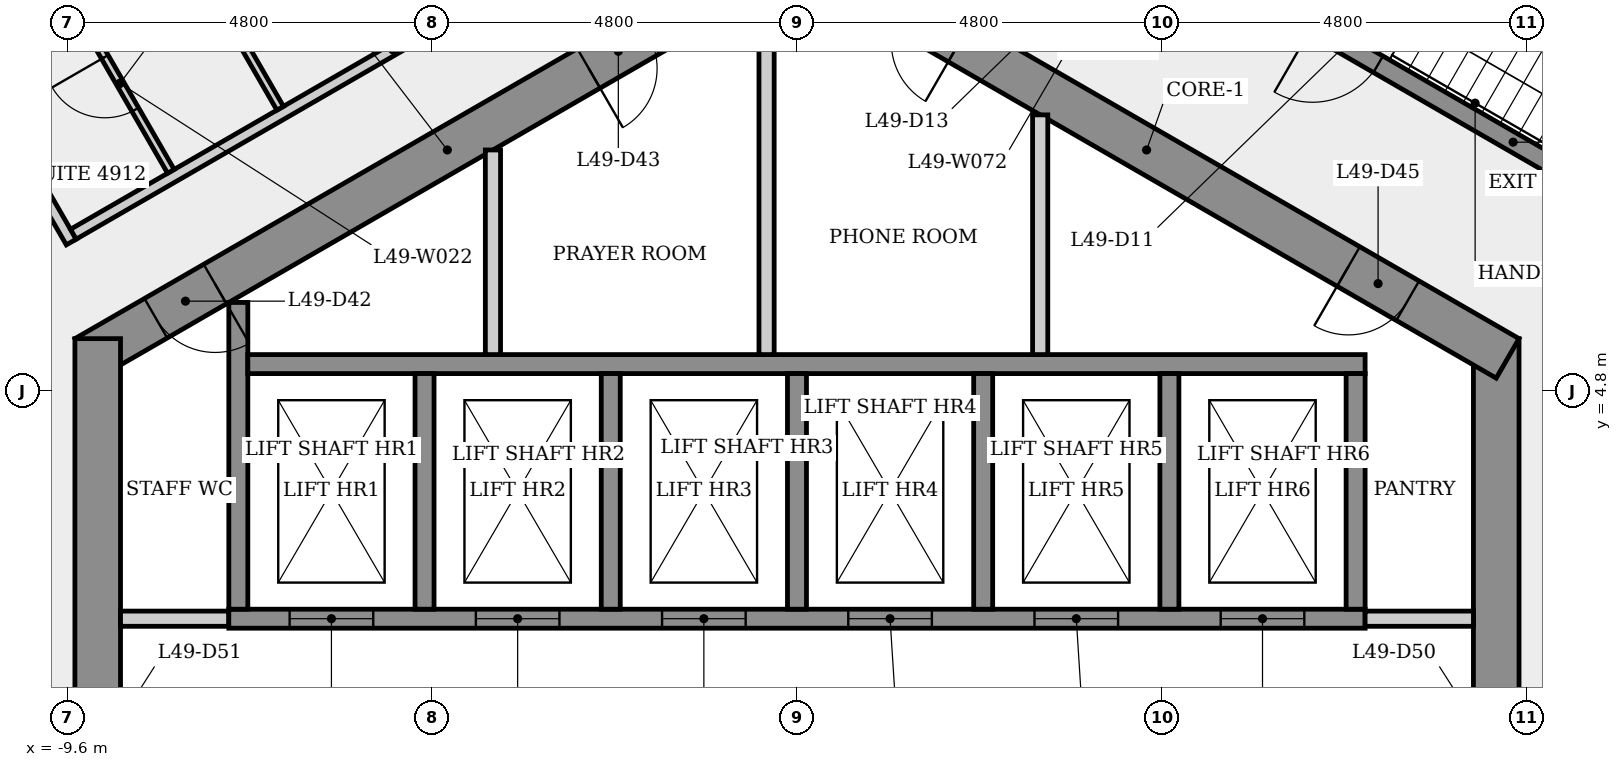
"""IFC4 building model, lengths in metres.
Left out: names, types, materials, properties, quantities, classifications, styles, units other than length and angle.
Written with IfcOpenShell. Run it as: python <this file> out.ifc"""

import sys

from ifc_helpers import new_model, si_unit, direction, frame, frame_2d, origin, place, context, subcontext, project, spatial, rectangle, extrude, element, fill, save


model = new_model("IFC4")
c1 = context("Model", 3, precision=1e-05, world=origin(), true_north=direction((0.0, 1.0)))
c2 = subcontext(c1, "Body", "Model", "MODEL_VIEW")
j1 = project(units=[si_unit("LENGTHUNIT", "METRE"), si_unit("PLANEANGLEUNIT", "RADIAN")], contexts=[c1])
p1 = place(None, origin())
s1 = spatial("IfcSite", under=j1, at=p1, CompositionType="ELEMENT")
p2 = place(p1, origin())
s2 = spatial("IfcBuilding", under=s1, at=p2, CompositionType="ELEMENT")
p3 = place(p2, frame((0.0, 0.0, 183.3)))
s3 = spatial("IfcBuildingStorey", under=s2, at=p3, CompositionType="ELEMENT", Elevation=183.3)
p4 = place(p3, frame((9.2, -5.485, 0.0), z_axis=(0.0, 0.0, 1.0), x_axis=(0.0, 1.0, 0.0)))
e1 = element("IfcWall", 1, at=p4, inside=s3, PredefinedType="SHEAR", context=c2, shape_type="SweptSolid", body=[
    extrude(rectangle(XDim=10.97, YDim=0.6, at=frame_2d((5.485, 0.0))), origin(), (0.0, 0.0, 1.0), 3.4),
])
p5 = place(p4, frame((4.685, 0.0, 0.0)))
e2 = element("IfcOpeningElement", 2, at=p5, cuts=e1, PredefinedType="OPENING", context=c2, shape_type="SweptSolid", body=[
    extrude(rectangle(XDim=1.6, YDim=2.1, at=frame_2d((0.8, 1.05))), frame((0.0, 0.31, 0.0), z_axis=(0.0, -1.0, 0.0), x_axis=(1.0, 0.0, 0.0)), (0.0, 0.0, 1.0), 0.62),
])
p6 = place(p3, frame((9.35, 5.225, 0.0), z_axis=(0.0, 0.0, 1.0), x_axis=(-0.866023993627, 0.500002442456, 0.0)))
e3 = element("IfcWall", 3, at=p6, inside=s3, PredefinedType="SHEAR", context=c2, shape_type="SweptSolid", body=[
    extrude(rectangle(XDim=10.97, YDim=0.6, at=frame_2d((5.485, 0.0))), origin(), (0.0, 0.0, 1.0), 3.4),
])
p7 = place(p6, frame((8.325, 0.0, 0.0)))
e4 = element("IfcOpeningElement", 4, at=p7, cuts=e3, PredefinedType="OPENING", context=c2, shape_type="SweptSolid", body=[
    extrude(rectangle(XDim=0.9, YDim=2.1, at=frame_2d((0.45, 1.05))), frame((0.0, 0.31, 0.0), z_axis=(0.0, -1.0, 0.0), x_axis=(1.0, 0.0, 0.0)), (0.0, 0.0, 1.0), 0.62),
])
p8 = place(p6, frame((1.518, 0.0, 0.0)))
e5 = element("IfcOpeningElement", 5, at=p8, cuts=e3, PredefinedType="OPENING", context=c2, shape_type="SweptSolid", body=[
    extrude(rectangle(XDim=0.9, YDim=2.1, at=frame_2d((0.45, 1.05))), frame((0.0, 0.31, 0.0), z_axis=(0.0, -1.0, 0.0), x_axis=(1.0, 0.0, 0.0)), (0.0, 0.0, 1.0), 0.62),
])
p9 = place(p3, frame((0.15, 10.71, 0.0), z_axis=(0.0, 0.0, 1.0), x_axis=(-0.866023993627, -0.500002442456, 0.0)))
e6 = element("IfcWall", 6, at=p9, inside=s3, PredefinedType="SHEAR", context=c2, shape_type="SweptSolid", body=[
    extrude(rectangle(XDim=10.97, YDim=0.6, at=frame_2d((5.485, 0.0))), origin(), (0.0, 0.0, 1.0), 3.4),
])
p10 = place(p9, frame((9.013, 0.0, 0.0)))
e7 = element("IfcOpeningElement", 7, at=p10, cuts=e6, PredefinedType="OPENING", context=c2, shape_type="SweptSolid", body=[
    extrude(rectangle(XDim=0.9, YDim=2.1, at=frame_2d((0.45, 1.05))), frame((0.0, 0.31, 0.0), z_axis=(0.0, -1.0, 0.0), x_axis=(1.0, 0.0, 0.0)), (0.0, 0.0, 1.0), 0.62),
])
p11 = place(p9, frame((2.437, 0.0, 0.0)))
e8 = element("IfcOpeningElement", 8, at=p11, cuts=e6, PredefinedType="OPENING", context=c2, shape_type="SweptSolid", body=[
    extrude(rectangle(XDim=0.9, YDim=2.1, at=frame_2d((0.45, 1.05))), frame((0.0, 0.31, 0.0), z_axis=(0.0, -1.0, 0.0), x_axis=(1.0, 0.0, 0.0)), (0.0, 0.0, 1.0), 0.62),
])
p12 = place(p3, frame((-9.2, 5.485, 0.0), z_axis=(0.0, 0.0, 1.0), x_axis=(0.0, -1.0, 0.0)))
e9 = element("IfcWall", 9, at=p12, inside=s3, PredefinedType="SHEAR", context=c2, shape_type="SweptSolid", body=[
    extrude(rectangle(XDim=10.97, YDim=0.6, at=frame_2d((5.485, 0.0))), origin(), (0.0, 0.0, 1.0), 3.4),
])
p13 = place(p12, frame((8.516, 0.0, 0.0)))
e10 = element("IfcOpeningElement", 10, at=p13, cuts=e9, PredefinedType="OPENING", context=c2, shape_type="SweptSolid", body=[
    extrude(rectangle(XDim=0.9, YDim=2.1, at=frame_2d((0.45, 1.05))), frame((0.0, 0.31, 0.0), z_axis=(0.0, -1.0, 0.0), x_axis=(1.0, 0.0, 0.0)), (0.0, 0.0, 1.0), 0.62),
])
p14 = place(p12, frame((4.685, 0.0, 0.0)))
e11 = element("IfcOpeningElement", 11, at=p14, cuts=e9, PredefinedType="OPENING", context=c2, shape_type="SweptSolid", body=[
    extrude(rectangle(XDim=1.6, YDim=2.1, at=frame_2d((0.8, 1.05))), frame((0.0, 0.31, 0.0), z_axis=(0.0, -1.0, 0.0), x_axis=(1.0, 0.0, 0.0)), (0.0, 0.0, 1.0), 0.62),
])
p15 = place(p3, frame((-12.04, 11.072, 0.0), z_axis=(0.0, 0.0, 1.0), x_axis=(0.499985374448, -0.866033847686, 0.0)))
e12 = element("IfcWall", 12, at=p15, inside=s3, PredefinedType="PARTITIONING", context=c2, shape_type="SweptSolid", body=[
    extrude(rectangle(XDim=4.984, YDim=0.15, at=frame_2d((2.492, 0.0))), origin(), (0.0, 0.0, 1.0), 3.0),
])
p16 = place(p15, frame((0.589, 0.0, 0.0)))
e13 = element("IfcOpeningElement", 13, at=p16, cuts=e12, PredefinedType="OPENING", context=c2, shape_type="SweptSolid", body=[
    extrude(rectangle(XDim=0.9, YDim=2.1, at=frame_2d((0.45, 1.05))), frame((0.0, 0.085, 0.0), z_axis=(0.0, -1.0, 0.0), x_axis=(1.0, 0.0, 0.0)), (0.0, 0.0, 1.0), 0.17),
])
p17 = place(p3, frame((-9.556, 10.071, 0.0), z_axis=(0.0, 0.0, 1.0), x_axis=(-0.866002311072, -0.500039995618, 0.0)))
e14 = element("IfcWall", 14, at=p17, inside=s3, PredefinedType="PARTITIONING", context=c2, shape_type="SweptSolid", body=[
    extrude(rectangle(XDim=1.575, YDim=0.1, at=frame_2d((0.788, 0.0))), origin(), (0.0, 0.0, 1.0), 3.0),
])
p18 = place(p3, frame((-9.521, 6.859, 0.0), z_axis=(0.0, 0.0, 1.0), x_axis=(0.866022649559, 0.500004770428, 0.0)))
e15 = element("IfcWall", 15, at=p18, inside=s3, PredefinedType="PARTITIONING", context=c2, shape_type="SweptSolid", body=[
    extrude(rectangle(XDim=9.707, YDim=0.15, at=frame_2d((4.853, 0.0))), origin(), (0.0, 0.0, 1.0), 3.0),
])
p19 = place(p18, frame((5.961, 0.0, 0.0)))
e16 = element("IfcOpeningElement", 16, at=p19, cuts=e15, PredefinedType="OPENING", context=c2, shape_type="SweptSolid", body=[
    extrude(rectangle(XDim=1.0, YDim=2.1, at=frame_2d((0.5, 1.05))), frame((0.0, 0.085, 0.0), z_axis=(0.0, -1.0, 0.0), x_axis=(1.0, 0.0, 0.0)), (0.0, 0.0, 1.0), 0.17),
])
p20 = place(p3, frame((-8.9, 1.8, 0.0), z_axis=(0.0, 0.0, 1.0), x_axis=(1.0, 0.0, 0.0)))
e17 = element("IfcWall", 17, at=p20, inside=s3, PredefinedType="PARTITIONING", context=c2, shape_type="SweptSolid", body=[
    extrude(rectangle(XDim=1.425, YDim=0.2, at=frame_2d((0.712, 0.0))), origin(), (0.0, 0.0, 1.0), 3.0),
])
p21 = place(p3, frame((-8.237, 7.686, 0.0), z_axis=(0.0, 0.0, 1.0), x_axis=(-0.499967368674, 0.86604424267, 0.0)))
e18 = element("IfcWall", 18, at=p21, inside=s3, PredefinedType="PARTITIONING", context=c2, shape_type="SweptSolid", body=[
    extrude(rectangle(XDim=2.675, YDim=0.1, at=frame_2d((1.337, 0.0))), origin(), (0.0, 0.0, 1.0), 3.0),
])
p22 = place(p21, frame((0.938, 0.0, 0.0)))
e19 = element("IfcOpeningElement", 19, at=p22, cuts=e18, PredefinedType="OPENING", context=c2, shape_type="SweptSolid", body=[
    extrude(rectangle(XDim=0.8, YDim=2.1, at=frame_2d((0.4, 1.05))), frame((0.0, 0.06, 0.0), z_axis=(0.0, -1.0, 0.0), x_axis=(1.0, 0.0, 0.0)), (0.0, 0.0, 1.0), 0.12),
])
p23 = place(p3, frame((-7.475, 1.8, 0.0), z_axis=(0.0, 0.0, 1.0), x_axis=(1.0, 0.0, 0.0)))
e20 = element("IfcWall", 20, at=p23, inside=s3, PredefinedType="SHEAR", context=c2, shape_type="SweptSolid", body=[
    extrude(rectangle(XDim=14.95, YDim=0.25, at=frame_2d((7.475, 0.0))), origin(), (0.0, 0.0, 1.0), 3.0),
])
p24 = place(p23, frame((0.8, 0.0, 0.0)))
e21 = element("IfcOpeningElement", 21, at=p24, cuts=e20, PredefinedType="OPENING", context=c2, shape_type="SweptSolid", body=[
    extrude(rectangle(XDim=1.1, YDim=2.1, at=frame_2d((0.55, 1.05))), frame((0.0, 0.135, 0.0), z_axis=(0.0, -1.0, 0.0), x_axis=(1.0, 0.0, 0.0)), (0.0, 0.0, 1.0), 0.27),
])
p25 = place(p23, frame((3.25, 0.0, 0.0)))
e22 = element("IfcOpeningElement", 22, at=p25, cuts=e20, PredefinedType="OPENING", context=c2, shape_type="SweptSolid", body=[
    extrude(rectangle(XDim=1.1, YDim=2.1, at=frame_2d((0.55, 1.05))), frame((0.0, 0.135, 0.0), z_axis=(0.0, -1.0, 0.0), x_axis=(1.0, 0.0, 0.0)), (0.0, 0.0, 1.0), 0.27),
])
p26 = place(p23, frame((5.7, 0.0, 0.0)))
e23 = element("IfcOpeningElement", 23, at=p26, cuts=e20, PredefinedType="OPENING", context=c2, shape_type="SweptSolid", body=[
    extrude(rectangle(XDim=1.1, YDim=2.1, at=frame_2d((0.55, 1.05))), frame((0.0, 0.135, 0.0), z_axis=(0.0, -1.0, 0.0), x_axis=(1.0, 0.0, 0.0)), (0.0, 0.0, 1.0), 0.27),
])
p27 = place(p23, frame((8.15, 0.0, 0.0)))
e24 = element("IfcOpeningElement", 24, at=p27, cuts=e20, PredefinedType="OPENING", context=c2, shape_type="SweptSolid", body=[
    extrude(rectangle(XDim=1.1, YDim=2.1, at=frame_2d((0.55, 1.05))), frame((0.0, 0.135, 0.0), z_axis=(0.0, -1.0, 0.0), x_axis=(1.0, 0.0, 0.0)), (0.0, 0.0, 1.0), 0.27),
])
p28 = place(p23, frame((10.6, 0.0, 0.0)))
e25 = element("IfcOpeningElement", 25, at=p28, cuts=e20, PredefinedType="OPENING", context=c2, shape_type="SweptSolid", body=[
    extrude(rectangle(XDim=1.1, YDim=2.1, at=frame_2d((0.55, 1.05))), frame((0.0, 0.135, 0.0), z_axis=(0.0, -1.0, 0.0), x_axis=(1.0, 0.0, 0.0)), (0.0, 0.0, 1.0), 0.27),
])
p29 = place(p23, frame((13.05, 0.0, 0.0)))
e26 = element("IfcOpeningElement", 26, at=p29, cuts=e20, PredefinedType="OPENING", context=c2, shape_type="SweptSolid", body=[
    extrude(rectangle(XDim=1.1, YDim=2.1, at=frame_2d((0.55, 1.05))), frame((0.0, 0.135, 0.0), z_axis=(0.0, -1.0, 0.0), x_axis=(1.0, 0.0, 0.0)), (0.0, 0.0, 1.0), 0.27),
])
p30 = place(p3, frame((-7.35, 1.925, 0.0), z_axis=(0.0, 0.0, 1.0), x_axis=(0.0, 1.0, 0.0)))
e27 = element("IfcWall", 27, at=p30, inside=s3, PredefinedType="SHEAR", context=c2, shape_type="SweptSolid", body=[
    extrude(rectangle(XDim=4.036, YDim=0.25, at=frame_2d((2.018, 0.0))), origin(), (0.0, 0.0, 1.0), 3.0),
])
p31 = place(p3, frame((-7.225, 5.15, 0.0), z_axis=(0.0, 0.0, 1.0), x_axis=(1.0, 0.0, 0.0)))
e28 = element("IfcWall", 28, at=p31, inside=s3, PredefinedType="SHEAR", context=c2, shape_type="SweptSolid", body=[
    extrude(rectangle(XDim=14.7, YDim=0.25, at=frame_2d((7.35, 0.0))), origin(), (0.0, 0.0, 1.0), 3.0),
])
p32 = place(p3, frame((-6.799, 8.516, 0.0), z_axis=(0.0, 0.0, 1.0), x_axis=(-0.500011399757, 0.866018822032, 0.0)))
e29 = element("IfcWall", 29, at=p32, inside=s3, PredefinedType="PARTITIONING", context=c2, shape_type="SweptSolid", body=[
    extrude(rectangle(XDim=7.411, YDim=0.1, at=frame_2d((3.706, 0.0))), origin(), (0.0, 0.0, 1.0), 3.0),
])
p33 = place(p3, frame((-4.9, 5.025, 0.0), z_axis=(0.0, 0.0, 1.0), x_axis=(0.0, -1.0, 0.0)))
e30 = element("IfcWall", 30, at=p33, inside=s3, PredefinedType="SHEAR", context=c2, shape_type="SweptSolid", body=[
    extrude(rectangle(XDim=3.1, YDim=0.25, at=frame_2d((1.55, 0.0))), origin(), (0.0, 0.0, 1.0), 3.4),
])
p34 = place(p3, frame((-4.0, 7.967, 0.0), z_axis=(0.0, 0.0, 1.0), x_axis=(0.0, -1.0, 0.0)))
e31 = element("IfcWall", 31, at=p34, inside=s3, PredefinedType="PARTITIONING", context=c2, shape_type="SweptSolid", body=[
    extrude(rectangle(XDim=2.692, YDim=0.2, at=frame_2d((1.346, 0.0))), origin(), (0.0, 0.0, 1.0), 3.0),
])
p35 = place(p3, frame((-2.45, 5.025, 0.0), z_axis=(0.0, 0.0, 1.0), x_axis=(0.0, -1.0, 0.0)))
e32 = element("IfcWall", 32, at=p35, inside=s3, PredefinedType="SHEAR", context=c2, shape_type="SweptSolid", body=[
    extrude(rectangle(XDim=3.1, YDim=0.25, at=frame_2d((1.55, 0.0))), origin(), (0.0, 0.0, 1.0), 3.4),
])
p36 = place(p3, frame((-0.4, 10.046, 0.0), z_axis=(0.0, 0.0, 1.0), x_axis=(0.0, -1.0, 0.0)))
e33 = element("IfcWall", 33, at=p36, inside=s3, PredefinedType="PARTITIONING", context=c2, shape_type="SweptSolid", body=[
    extrude(rectangle(XDim=4.771, YDim=0.2, at=frame_2d((2.385, 0.0))), origin(), (0.0, 0.0, 1.0), 3.0),
])
for number, where, z_axis, x_axis in (
    (34, (0.0, 5.025, 0.0), (0.0, 0.0, 1.0), (0.0, -1.0, 0.0)),
    (35, (2.45, 5.025, 0.0), (0.0, 0.0, 1.0), (0.0, -1.0, 0.0)),
):
    element("IfcWall", number, at=place(p3, frame(where, z_axis=z_axis, x_axis=x_axis)), inside=s3, PredefinedType="SHEAR", context=c2, shape_type="SweptSolid", body=[
        extrude(rectangle(XDim=3.1, YDim=0.25, at=frame_2d((1.55, 0.0))), origin(), (0.0, 0.0, 1.0), 3.4),
    ])
p37 = place(p3, frame((3.2, 8.429, 0.0), z_axis=(0.0, 0.0, 1.0), x_axis=(0.0, -1.0, 0.0)))
e36 = element("IfcWall", 36, at=p37, inside=s3, PredefinedType="PARTITIONING", context=c2, shape_type="SweptSolid", body=[
    extrude(rectangle(XDim=3.154, YDim=0.2, at=frame_2d((1.577, 0.0))), origin(), (0.0, 0.0, 1.0), 3.0),
])
p38 = place(p3, frame((4.9, 5.025, 0.0), z_axis=(0.0, 0.0, 1.0), x_axis=(0.0, -1.0, 0.0)))
e37 = element("IfcWall", 37, at=p38, inside=s3, PredefinedType="SHEAR", context=c2, shape_type="SweptSolid", body=[
    extrude(rectangle(XDim=3.1, YDim=0.25, at=frame_2d((1.55, 0.0))), origin(), (0.0, 0.0, 1.0), 3.4),
])
p39 = place(p3, frame((7.475, 1.8, 0.0), z_axis=(0.0, 0.0, 1.0), x_axis=(1.0, 0.0, 0.0)))
e38 = element("IfcWall", 38, at=p39, inside=s3, PredefinedType="PARTITIONING", context=c2, shape_type="SweptSolid", body=[
    extrude(rectangle(XDim=1.425, YDim=0.2, at=frame_2d((0.712, 0.0))), origin(), (0.0, 0.0, 1.0), 3.0),
])
p40 = place(p3, frame((7.35, 5.025, 0.0), z_axis=(0.0, 0.0, 1.0), x_axis=(0.0, -1.0, 0.0)))
e39 = element("IfcWall", 39, at=p40, inside=s3, PredefinedType="SHEAR", context=c2, shape_type="SweptSolid", body=[
    extrude(rectangle(XDim=3.1, YDim=0.25, at=frame_2d((1.55, 0.0))), origin(), (0.0, 0.0, 1.0), 3.4),
])
p41 = place(p3, frame((8.151, 12.268, 0.0), z_axis=(0.0, 0.0, 1.0), x_axis=(0.866025499775, -0.499999833739, 0.0)))
e40 = element("IfcWall", 40, at=p41, inside=s3, PredefinedType="SHEAR", context=c2, shape_type="SweptSolid", body=[
    extrude(rectangle(XDim=6.4, YDim=0.25, at=frame_2d((3.2, 0.0))), origin(), (0.0, 0.0, 1.0), 3.0),
])
p42 = place(p3, frame((12.194, 6.47, 0.0), z_axis=(0.0, 0.0, 1.0), x_axis=(-0.866025499775, 0.499999833739, 0.0)))
e41 = element("IfcWall", 41, at=p42, inside=s3, PredefinedType="SHEAR", context=c2, shape_type="SweptSolid", body=[
    extrude(rectangle(XDim=6.4, YDim=0.25, at=frame_2d((3.2, 0.0))), origin(), (0.0, 0.0, 1.0), 3.0),
])
p43 = place(p42, frame((5.25, 0.0, 0.0)))
e42 = element("IfcOpeningElement", 42, at=p43, cuts=e41, PredefinedType="OPENING", context=c2, shape_type="SweptSolid", body=[
    extrude(rectangle(XDim=1.0, YDim=2.1, at=frame_2d((0.5, 1.05))), frame((0.0, 0.135, 0.0), z_axis=(0.0, -1.0, 0.0), x_axis=(1.0, 0.0, 0.0)), (0.0, 0.0, 1.0), 0.27),
])
p44 = place(p24, origin())
e43 = element("IfcDoor", 43, at=p44, inside=s3, OperationType="SLIDING_TO_LEFT", PredefinedType="DOOR", context=c2, shape_type="SweptSolid", body=[
    extrude(rectangle(XDim=1.1, YDim=2.1, at=frame_2d((0.55, 1.05))), frame((0.0, 0.025, 0.0), z_axis=(0.0, -1.0, 0.0), x_axis=(1.0, 0.0, 0.0)), (0.0, 0.0, 1.0), 0.05),
])
fill(e21, e43)
p45 = place(p25, origin())
e44 = element("IfcDoor", 44, at=p45, inside=s3, OperationType="SLIDING_TO_LEFT", PredefinedType="DOOR", context=c2, shape_type="SweptSolid", body=[
    extrude(rectangle(XDim=1.1, YDim=2.1, at=frame_2d((0.55, 1.05))), frame((0.0, 0.025, 0.0), z_axis=(0.0, -1.0, 0.0), x_axis=(1.0, 0.0, 0.0)), (0.0, 0.0, 1.0), 0.05),
])
fill(e22, e44)
p46 = place(p26, origin())
e45 = element("IfcDoor", 45, at=p46, inside=s3, OperationType="SLIDING_TO_LEFT", PredefinedType="DOOR", context=c2, shape_type="SweptSolid", body=[
    extrude(rectangle(XDim=1.1, YDim=2.1, at=frame_2d((0.55, 1.05))), frame((0.0, 0.025, 0.0), z_axis=(0.0, -1.0, 0.0), x_axis=(1.0, 0.0, 0.0)), (0.0, 0.0, 1.0), 0.05),
])
fill(e23, e45)
p47 = place(p27, origin())
e46 = element("IfcDoor", 46, at=p47, inside=s3, OperationType="SLIDING_TO_LEFT", PredefinedType="DOOR", context=c2, shape_type="SweptSolid", body=[
    extrude(rectangle(XDim=1.1, YDim=2.1, at=frame_2d((0.55, 1.05))), frame((0.0, 0.025, 0.0), z_axis=(0.0, -1.0, 0.0), x_axis=(1.0, 0.0, 0.0)), (0.0, 0.0, 1.0), 0.05),
])
fill(e24, e46)
p48 = place(p28, origin())
e47 = element("IfcDoor", 47, at=p48, inside=s3, OperationType="SLIDING_TO_LEFT", PredefinedType="DOOR", context=c2, shape_type="SweptSolid", body=[
    extrude(rectangle(XDim=1.1, YDim=2.1, at=frame_2d((0.55, 1.05))), frame((0.0, 0.025, 0.0), z_axis=(0.0, -1.0, 0.0), x_axis=(1.0, 0.0, 0.0)), (0.0, 0.0, 1.0), 0.05),
])
fill(e25, e47)
p49 = place(p29, origin())
e48 = element("IfcDoor", 48, at=p49, inside=s3, OperationType="SLIDING_TO_LEFT", PredefinedType="DOOR", context=c2, shape_type="SweptSolid", body=[
    extrude(rectangle(XDim=1.1, YDim=2.1, at=frame_2d((0.55, 1.05))), frame((0.0, 0.025, 0.0), z_axis=(0.0, -1.0, 0.0), x_axis=(1.0, 0.0, 0.0)), (0.0, 0.0, 1.0), 0.05),
])
fill(e26, e48)
p50 = place(p43, origin())
e49 = element("IfcDoor", 49, at=p50, inside=s3, OperationType="SINGLE_SWING_RIGHT", PredefinedType="DOOR", context=c2, shape_type="SweptSolid", body=[
    extrude(rectangle(XDim=1.0, YDim=2.1, at=frame_2d((0.5, 1.05))), frame((0.0, 0.025, 0.0), z_axis=(0.0, -1.0, 0.0), x_axis=(1.0, 0.0, 0.0)), (0.0, 0.0, 1.0), 0.05),
])
fill(e42, e49)
p51 = place(p22, origin())
e50 = element("IfcDoor", 50, at=p51, inside=s3, OperationType="SINGLE_SWING_RIGHT", PredefinedType="DOOR", context=c2, shape_type="SweptSolid", body=[
    extrude(rectangle(XDim=0.8, YDim=2.1, at=frame_2d((0.4, 1.05))), frame((0.0, 0.025, 0.0), z_axis=(0.0, -1.0, 0.0), x_axis=(1.0, 0.0, 0.0)), (0.0, 0.0, 1.0), 0.05),
])
fill(e19, e50)
p52 = place(p10, origin())
e51 = element("IfcDoor", 51, at=p52, inside=s3, OperationType="SINGLE_SWING_LEFT", PredefinedType="DOOR", context=c2, shape_type="SweptSolid", body=[
    extrude(rectangle(XDim=0.9, YDim=2.1, at=frame_2d((0.45, 1.05))), frame((0.0, 0.025, 0.0), z_axis=(0.0, -1.0, 0.0), x_axis=(1.0, 0.0, 0.0)), (0.0, 0.0, 1.0), 0.05),
])
fill(e7, e51)
p53 = place(p11, origin())
e52 = element("IfcDoor", 52, at=p53, inside=s3, OperationType="SINGLE_SWING_RIGHT", PredefinedType="DOOR", context=c2, shape_type="SweptSolid", body=[
    extrude(rectangle(XDim=0.9, YDim=2.1, at=frame_2d((0.45, 1.05))), frame((0.0, 0.025, 0.0), z_axis=(0.0, -1.0, 0.0), x_axis=(1.0, 0.0, 0.0)), (0.0, 0.0, 1.0), 0.05),
])
fill(e8, e52)
p54 = place(p8, origin())
e53 = element("IfcDoor", 53, at=p54, inside=s3, OperationType="SINGLE_SWING_RIGHT", PredefinedType="DOOR", context=c2, shape_type="SweptSolid", body=[
    extrude(rectangle(XDim=0.9, YDim=2.1, at=frame_2d((0.45, 1.05))), frame((0.0, 0.025, 0.0), z_axis=(0.0, -1.0, 0.0), x_axis=(1.0, 0.0, 0.0)), (0.0, 0.0, 1.0), 0.05),
])
fill(e5, e53)
save(model, sys.argv[1])
